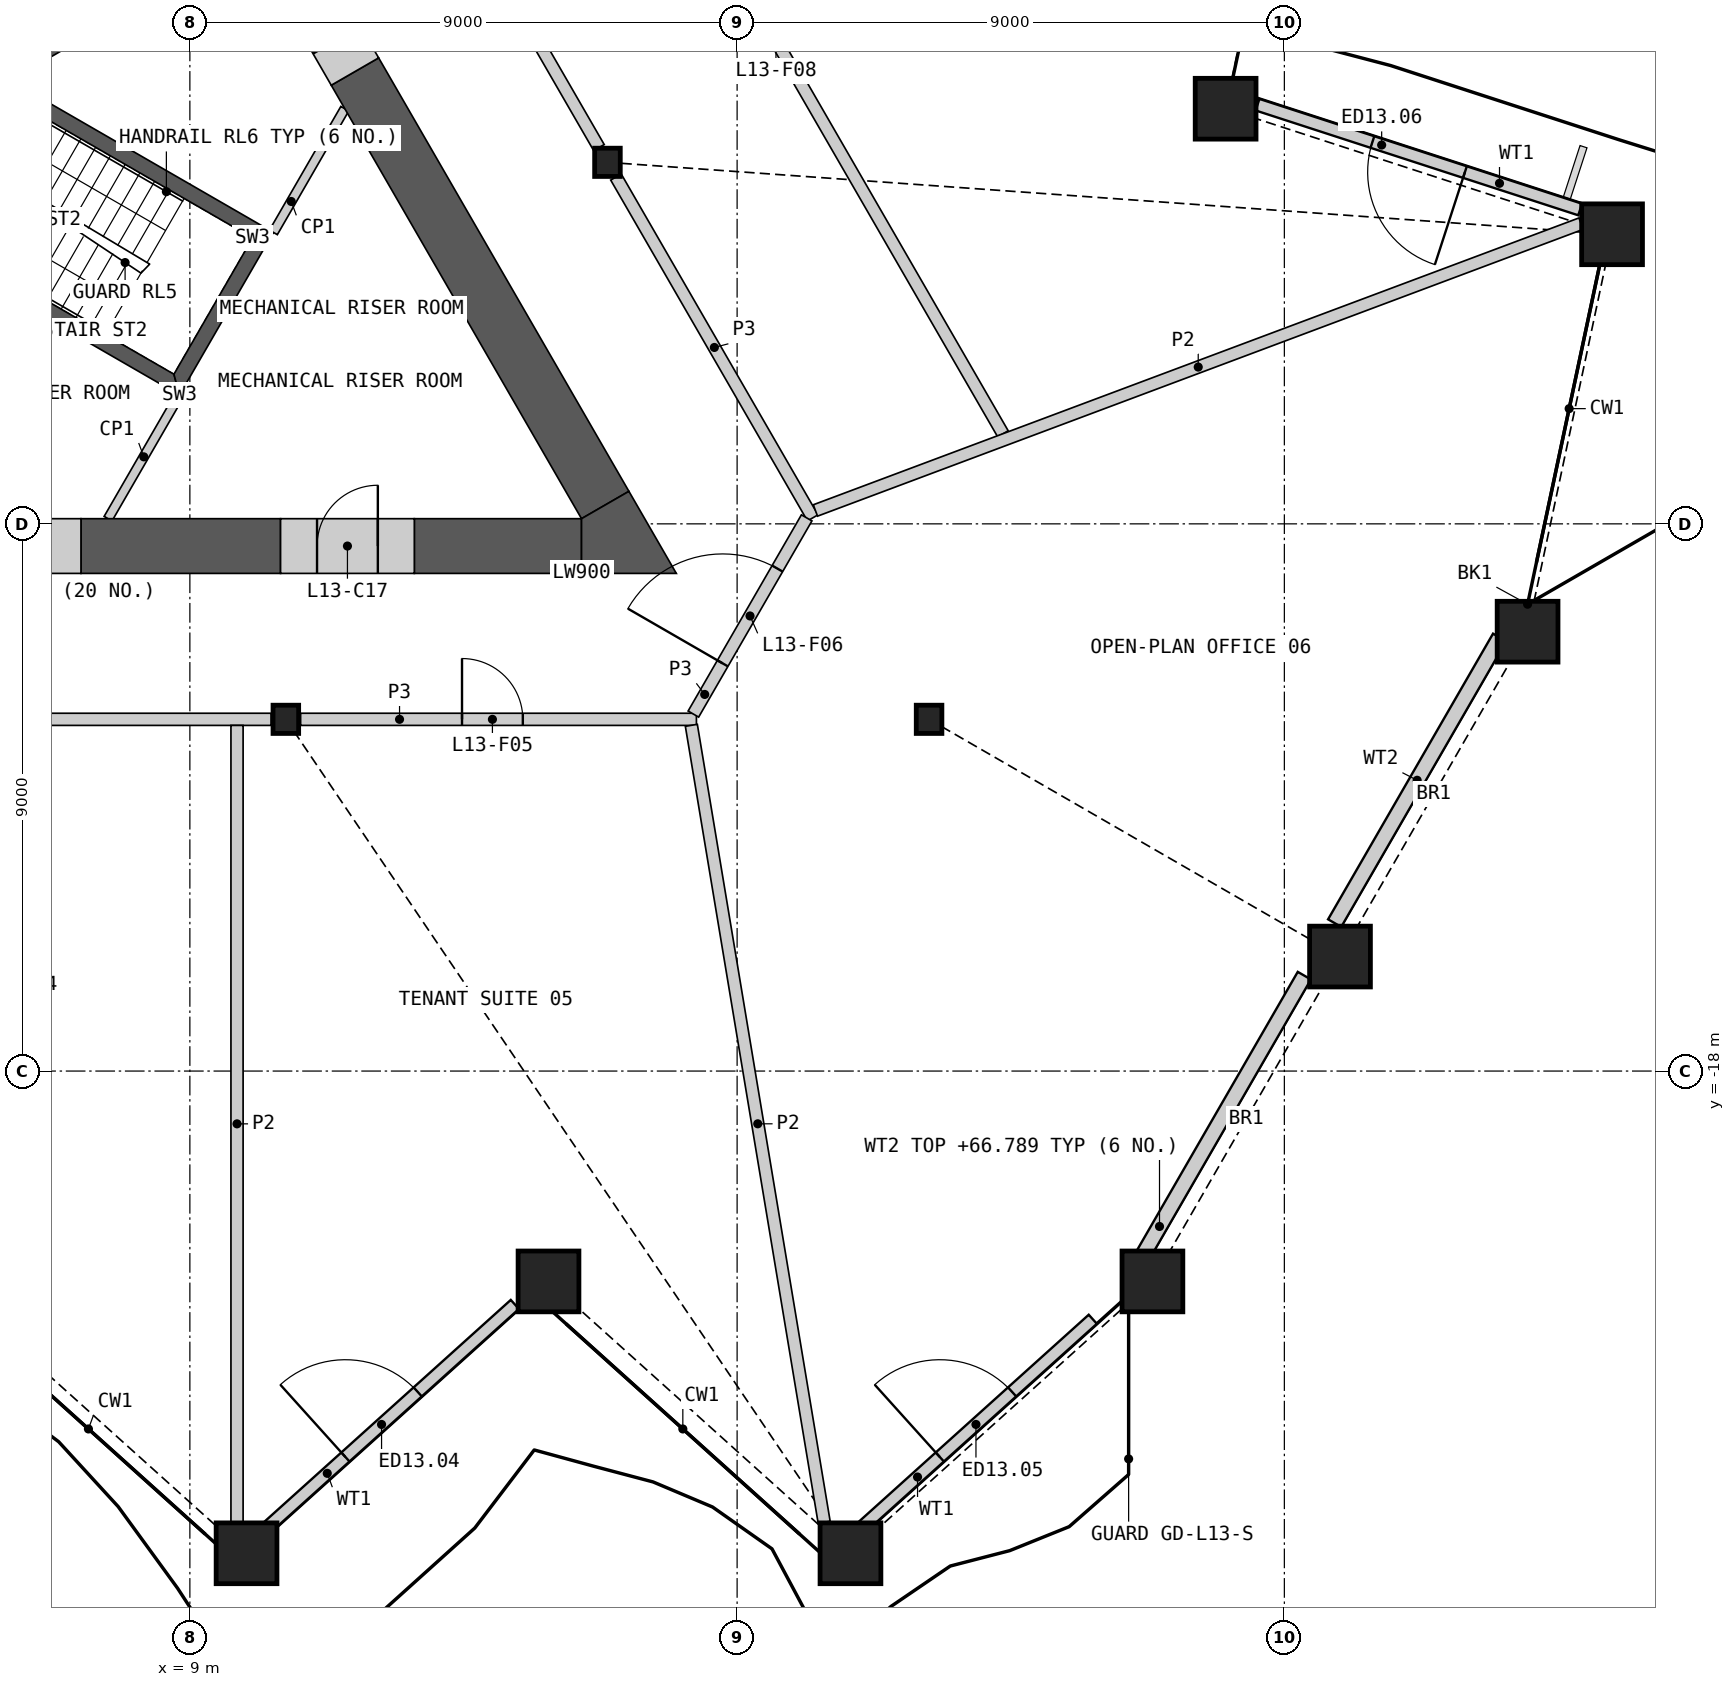
"""IFC4 building model, lengths in metres.
Left out: names, types, materials, properties, quantities, classifications, styles, units other than length and angle.
Written with IfcOpenShell. Run it as: python <this file> out.ifc"""

import sys

from ifc_helpers import new_model, si_unit, direction, frame, frame_2d, origin, origin_2d, place, context, subcontext, project, spatial, polyline, rectangle, hollow_rectangle, i_section, outline, extrude, element, fill, save


model = new_model("IFC4")
c1 = context("Model", 3, precision=1e-05, world=origin(), true_north=direction((0.0, 1.0)))
c2 = subcontext(c1, "Body", "Model", "MODEL_VIEW")
j1 = project(units=[si_unit("LENGTHUNIT", "METRE"), si_unit("PLANEANGLEUNIT", "RADIAN")], contexts=[c1])
p1 = place(None, origin())
s1 = spatial("IfcSite", under=j1, at=p1, CompositionType="ELEMENT")
p2 = place(p1, origin())
s2 = spatial("IfcBuilding", under=s1, at=p2, CompositionType="ELEMENT")
p3 = place(p2, frame((0.0, 0.0, 63.6)))
s3 = spatial("IfcBuildingStorey", under=s2, at=p3, CompositionType="ELEMENT", Elevation=63.6)
for number, where, z_axis, x_axis in (
    (1, (9.932, -25.931, 0.0), (0.0, 0.0, 1.0), (1.0, 0.0, 0.0)),
    (2, (14.898, -21.46, 0.0), (0.0, 0.0, 1.0), (1.0, 0.0, 0.0)),
    (3, (19.864, -25.931, 0.0), (0.0, 0.0, 1.0), (1.0, 0.0, 0.0)),
    (4, (24.83, -21.46, 0.0), (0.0, 0.0, 1.0), (1.0, 0.0, 0.0)),
    (5, (27.915, -16.117, 0.0), (0.0, 0.0, 1.0), (1.0, 0.0, 0.0)),
    (6, (31.0, -10.774, 0.0), (0.0, 0.0, 1.0), (1.0, 0.0, 0.0)),
    (7, (32.389, -4.237, 0.0), (0.0, 0.0, 1.0), (1.0, 0.0, 0.0)),
    (8, (26.034, -2.172, 0.0), (0.0, 0.0, 1.0), (1.0, 0.0, 0.0)),
):
    element("IfcColumn", number, at=place(p3, frame(where, z_axis=z_axis, x_axis=x_axis)), inside=s3, PredefinedType="COLUMN", context=c2, shape_type="SweptSolid", body=[
        extrude(hollow_rectangle(XDim=1.0, YDim=1.0, WallThickness=0.07, at=origin_2d()), origin(), (0.0, 0.0, 1.0), 4.2),
    ])
for number, where, z_axis, x_axis in (
    (9, (10.578, -12.215, 0.0), (0.0, 0.0, 1.0), (1.0, 0.0, 0.0)),
    (10, (21.157, -12.215, 0.0), (0.0, 0.0, 1.0), (1.0, 0.0, 0.0)),
    (11, (15.868, -3.054, 0.0), (0.0, 0.0, 1.0), (1.0, 0.0, 0.0)),
):
    element("IfcColumn", number, at=place(p3, frame(where, z_axis=z_axis, x_axis=x_axis)), inside=s3, PredefinedType="COLUMN", context=c2, shape_type="SweptSolid", body=[
        extrude(i_section(OverallWidth=0.421, OverallDepth=0.465, WebThickness=0.045, FlangeThickness=0.072, at=origin_2d()), origin(), (0.0, 0.0, 1.0), 4.2),
    ])
p4 = place(p3, frame((10.231, -25.542, 0.0), z_axis=(0.0, 0.0, 1.0), x_axis=(0.743162549077, 0.669110921783, 0.0)))
e12 = element("IfcWall", 12, at=p4, inside=s3, PredefinedType="SOLIDWALL", context=c2, shape_type="SweptSolid", body=[
    extrude(rectangle(XDim=5.535, YDim=0.2, at=frame_2d((2.768, 0.0))), origin(), (0.0, 0.0, 1.0), 3.189),
])
p5 = place(p4, frame((1.786, 0.0, 0.0)))
e13 = element("IfcOpeningElement", 13, at=p5, cuts=e12, PredefinedType="OPENING", context=c2, shape_type="SweptSolid", body=[
    extrude(rectangle(XDim=1.6, YDim=2.4, at=frame_2d((0.8, 1.2))), frame((0.0, 0.11, 0.0), z_axis=(0.0, -1.0, 0.0), x_axis=(1.0, 0.0, 0.0)), (0.0, 0.0, 1.0), 0.22),
])
p6 = place(p3, frame((20.007, -25.542, 0.0), z_axis=(0.0, 0.0, 1.0), x_axis=(0.743150930715, 0.669123825743, 0.0)))
e14 = element("IfcWall", 14, at=p6, inside=s3, PredefinedType="SOLIDWALL", context=c2, shape_type="SweptSolid", body=[
    extrude(rectangle(XDim=5.171, YDim=0.2, at=frame_2d((2.585, 0.0))), origin(), (0.0, 0.0, 1.0), 3.189),
])
p7 = place(p6, frame((1.786, 0.0, 0.0)))
e15 = element("IfcOpeningElement", 15, at=p7, cuts=e14, PredefinedType="OPENING", context=c2, shape_type="SweptSolid", body=[
    extrude(rectangle(XDim=1.6, YDim=2.4, at=frame_2d((0.8, 1.2))), frame((0.0, 0.11, 0.0), z_axis=(0.0, -1.0, 0.0), x_axis=(1.0, 0.0, 0.0)), (0.0, 0.0, 1.0), 0.22),
])
p8 = place(p3, frame((24.682, -21.015, 0.0), z_axis=(0.0, 0.0, 1.0), x_axis=(0.500008603535, 0.866020436474, 0.0)))
e16 = element("IfcWall", 16, at=p8, inside=s3, PredefinedType="SOLIDWALL", context=c2, shape_type="SweptSolid", body=[
    extrude(rectangle(XDim=5.293, YDim=0.25, at=frame_2d((2.646, 0.0))), origin(), (0.0, 0.0, 1.0), 3.189),
])
p9 = place(p3, frame((27.827, -15.567, 0.0), z_axis=(0.0, 0.0, 1.0), x_axis=(0.499991204533, 0.86603048179, 0.0)))
e17 = element("IfcWall", 17, at=p9, inside=s3, PredefinedType="SOLIDWALL", context=c2, shape_type="SweptSolid", body=[
    extrude(rectangle(XDim=5.426, YDim=0.25, at=frame_2d((2.713, 0.0))), origin(), (0.0, 0.0, 1.0), 3.189),
])
p10 = place(p3, frame((31.865, -3.83, 0.0), z_axis=(0.0, 0.0, 1.0), x_axis=(-0.951054004345, 0.309024725255, 0.0)))
e18 = element("IfcWall", 18, at=p10, inside=s3, PredefinedType="SOLIDWALL", context=c2, shape_type="SweptSolid", body=[
    extrude(rectangle(XDim=5.579, YDim=0.2, at=frame_2d((2.79, 0.0))), origin(), (0.0, 0.0, 1.0), 3.189),
])
p11 = place(p10, frame((1.992, 0.0, 0.0)))
e19 = element("IfcOpeningElement", 19, at=p11, cuts=e18, PredefinedType="OPENING", context=c2, shape_type="SweptSolid", body=[
    extrude(rectangle(XDim=1.6, YDim=2.4, at=frame_2d((0.8, 1.2))), frame((0.0, 0.11, 0.0), z_axis=(0.0, -1.0, 0.0), x_axis=(1.0, 0.0, 0.0)), (0.0, 0.0, 1.0), 0.22),
])
p12 = place(p3, origin())
e20 = element("IfcWall", 20, at=p12, inside=s3, PredefinedType="SHEAR", context=c2, shape_type="SweptSolid", body=[
    extrude(outline(polyline([(2.66, 4.192), (4.831, 5.445), (8.231, -0.444), (6.061, -1.697), (5.96, -1.524), (7.952, -0.374), (6.952, 1.358), (4.96, 0.208), (4.861, 0.381), (6.852, 1.531), (5.852, 3.263), (3.861, 2.113), (3.76, 2.287), (5.752, 3.437), (4.752, 5.169), (2.76, 4.019), (2.66, 4.192)])), origin(), (0.0, 0.0, 1.0), 3.8),
])
p13 = place(p3, origin())
e21 = element("IfcWall", 21, at=p13, inside=s3, PredefinedType="SHEAR", context=c2, shape_type="SweptSolid", body=[
    extrude(outline(polyline([(3.763, -3.956), (8.83, -6.881), (8.738, -6.539), (3.888, -3.739), (3.763, -3.956)])), origin(), (0.0, 0.0, 1.0), 3.8),
])
p14 = place(p3, origin())
e22 = element("IfcWall", 22, at=p14, inside=s3, PredefinedType="SHEAR", context=c2, shape_type="SweptSolid", body=[
    extrude(outline(polyline([(8.83, -6.881), (10.374, -4.206), (10.032, -4.298), (8.738, -6.539), (8.83, -6.881)])), origin(), (0.0, 0.0, 1.0), 3.8),
])
p15 = place(p3, origin())
e23 = element("IfcWall", 23, at=p15, inside=s3, PredefinedType="SHEAR", context=c2, shape_type="SweptSolid", body=[
    extrude(outline(polyline([(10.032, -4.298), (10.374, -4.206), (5.307, -1.281), (5.182, -1.498), (10.032, -4.298)])), origin(), (0.0, 0.0, 1.0), 3.8),
])
p16 = place(p3, frame((8.83, -6.881, 0.0), z_axis=(0.0, 0.0, 1.0), x_axis=(-0.500073279432, -0.865983091751, 0.0)))
e24 = element("IfcWall", 24, at=p16, inside=s3, PredefinedType="PARTITIONING", context=c2, shape_type="SweptSolid", body=[
    extrude(rectangle(XDim=2.349, YDim=0.15, at=frame_2d((1.175, 0.0))), origin(), (0.0, 0.0, 1.0), 3.8),
])
p17 = place(p3, frame((10.374, -4.206, 0.0), z_axis=(0.0, 0.0, 1.0), x_axis=(0.499995339376, 0.86602809458, 0.0)))
e25 = element("IfcWall", 25, at=p17, inside=s3, PredefinedType="PARTITIONING", context=c2, shape_type="SweptSolid", body=[
    extrude(rectangle(XDim=2.349, YDim=0.15, at=frame_2d((1.175, 0.0))), origin(), (0.0, 0.0, 1.0), 3.8),
])
p18 = place(p3, frame((7.209, -9.365, 0.0), z_axis=(0.0, 0.0, 1.0), x_axis=(1.0, 0.0, 0.0)))
e26 = element("IfcWall", 26, at=p18, inside=s3, PredefinedType="SHEAR", context=c2, shape_type="SweptSolid", body=[
    extrude(rectangle(XDim=3.282, YDim=0.9, at=frame_2d((1.641, 0.0))), origin(), (0.0, 0.0, 1.0), 3.8),
])
p19 = place(p3, frame((12.691, -9.365, 0.0), z_axis=(0.0, 0.0, 1.0), x_axis=(1.0, 0.0, 0.0)))
e27 = element("IfcWall", 27, at=p19, inside=s3, PredefinedType="SHEAR", context=c2, shape_type="SweptSolid", body=[
    extrude(rectangle(XDim=2.75, YDim=0.9, at=frame_2d((1.375, 0.0))), origin(), (0.0, 0.0, 1.0), 3.8),
])
p20 = place(p3, frame((15.831, -8.69, 0.0), z_axis=(0.0, 0.0, 1.0), x_axis=(-0.499995435471, 0.8660280391, 0.0)))
e28 = element("IfcWall", 28, at=p20, inside=s3, PredefinedType="SHEAR", context=c2, shape_type="SweptSolid", body=[
    extrude(rectangle(XDim=8.232, YDim=0.9, at=frame_2d((4.116, 0.0))), origin(), (0.0, 0.0, 1.0), 3.8),
])
p21 = place(p3, origin())
e29 = element("IfcWall", 29, at=p21, inside=s3, PredefinedType="SHEAR", context=c2, shape_type="SweptSolid", body=[
    extrude(outline(polyline([(15.441, -9.815), (15.441, -8.915), (16.221, -8.465), (17.0, -9.815), (15.441, -9.815)])), origin(), (0.0, 0.0, 1.0), 3.8),
])
p22 = place(p3, frame((10.491, -9.365, 0.0), z_axis=(0.0, 0.0, 1.0), x_axis=(1.0, 0.0, 0.0)))
e30 = element("IfcWall", 30, at=p22, inside=s3, PredefinedType="SHEAR", context=c2, shape_type="SweptSolid", body=[
    extrude(rectangle(XDim=2.2, YDim=0.9, at=frame_2d((1.1, 0.0))), origin(), (0.0, 0.0, 1.0), 3.8),
])
p23 = place(p22, frame((0.6, 0.0, 0.0)))
e31 = element("IfcOpeningElement", 31, at=p23, cuts=e30, PredefinedType="OPENING", context=c2, shape_type="SweptSolid", body=[
    extrude(rectangle(XDim=1.0, YDim=2.1, at=frame_2d((0.5, 1.05))), frame((0.0, 0.46, 0.0), z_axis=(0.0, -1.0, 0.0), x_axis=(1.0, 0.0, 0.0)), (0.0, 0.0, 1.0), 0.92),
])
p24 = place(p3, frame((11.715, -1.561, 0.0), z_axis=(0.0, 0.0, 1.0), x_axis=(-0.499946605688, 0.86605622881, 0.0)))
e32 = element("IfcWall", 32, at=p24, inside=s3, PredefinedType="SHEAR", context=c2, shape_type="SweptSolid", body=[
    extrude(rectangle(XDim=2.2, YDim=0.9, at=frame_2d((1.1, 0.0))), origin(), (0.0, 0.0, 1.0), 3.8),
])
p25 = place(p24, frame((0.6, 0.0, 0.0)))
e33 = element("IfcOpeningElement", 33, at=p25, cuts=e32, PredefinedType="OPENING", context=c2, shape_type="SweptSolid", body=[
    extrude(rectangle(XDim=1.0, YDim=2.1, at=frame_2d((0.5, 1.05))), frame((0.0, 0.46, 0.0), z_axis=(0.0, -1.0, 0.0), x_axis=(1.0, 0.0, 0.0)), (0.0, 0.0, 1.0), 0.92),
])
p26 = place(p3, frame((5.009, -9.365, 0.0), z_axis=(0.0, 0.0, 1.0), x_axis=(1.0, 0.0, 0.0)))
e34 = element("IfcWall", 34, at=p26, inside=s3, PredefinedType="SHEAR", context=c2, shape_type="SweptSolid", body=[
    extrude(rectangle(XDim=2.2, YDim=0.9, at=frame_2d((1.1, 0.0))), origin(), (0.0, 0.0, 1.0), 3.8),
])
p27 = place(p26, frame((0.6, 0.0, 0.0)))
e35 = element("IfcOpeningElement", 35, at=p27, cuts=e34, PredefinedType="OPENING", context=c2, shape_type="SweptSolid", body=[
    extrude(rectangle(XDim=1.0, YDim=2.1, at=frame_2d((0.5, 1.05))), frame((0.0, 0.46, 0.0), z_axis=(0.0, -1.0, 0.0), x_axis=(1.0, 0.0, 0.0)), (0.0, 0.0, 1.0), 0.92),
])
p28 = place(p3, frame((0.242, -12.215, 0.0), z_axis=(0.0, 0.0, 1.0), x_axis=(1.0, 0.0, 0.0)))
e36 = element("IfcWall", 36, at=p28, inside=s3, PredefinedType="PARTITIONING", context=c2, shape_type="SweptSolid", body=[
    extrude(rectangle(XDim=10.094, YDim=0.2, at=frame_2d((5.047, 0.0))), origin(), (0.0, 0.0, 1.0), 3.8),
])
p29 = place(p28, frame((4.294, 0.0, 0.0)))
e37 = element("IfcOpeningElement", 37, at=p29, cuts=e36, PredefinedType="OPENING", context=c2, shape_type="SweptSolid", body=[
    extrude(rectangle(XDim=1.0, YDim=2.1, at=frame_2d((0.5, 1.05))), frame((0.0, 0.11, 0.0), z_axis=(0.0, -1.0, 0.0), x_axis=(1.0, 0.0, 0.0)), (0.0, 0.0, 1.0), 0.22),
])
p30 = place(p3, frame((10.719, 5.865, 0.0), z_axis=(0.0, 0.0, 1.0), x_axis=(0.49999175339, -0.866030164915, 0.0)))
e38 = element("IfcWall", 38, at=p30, inside=s3, PredefinedType="PARTITIONING", context=c2, shape_type="SweptSolid", body=[
    extrude(rectangle(XDim=10.019, YDim=0.2, at=frame_2d((5.009, 0.0))), origin(), (0.0, 0.0, 1.0), 3.8),
])
p31 = place(p30, frame((4.585, 0.0, 0.0)))
e39 = element("IfcOpeningElement", 39, at=p31, cuts=e38, PredefinedType="OPENING", context=c2, shape_type="SweptSolid", body=[
    extrude(rectangle(XDim=0.95, YDim=2.1, at=frame_2d((0.475, 1.05))), frame((0.0, 0.11, 0.0), z_axis=(0.0, -1.0, 0.0), x_axis=(1.0, 0.0, 0.0)), (0.0, 0.0, 1.0), 0.22),
])
p32 = place(p3, frame((10.821, -12.215, 0.0), z_axis=(0.0, 0.0, 1.0), x_axis=(1.0, 0.0, 0.0)))
e40 = element("IfcWall", 40, at=p32, inside=s3, PredefinedType="PARTITIONING", context=c2, shape_type="SweptSolid", body=[
    extrude(rectangle(XDim=6.51, YDim=0.2, at=frame_2d((3.255, 0.0))), origin(), (0.0, 0.0, 1.0), 3.8),
])
p33 = place(p32, frame((2.655, 0.0, 0.0)))
e41 = element("IfcOpeningElement", 41, at=p33, cuts=e40, PredefinedType="OPENING", context=c2, shape_type="SweptSolid", body=[
    extrude(rectangle(XDim=1.0, YDim=2.1, at=frame_2d((0.5, 1.05))), frame((0.0, 0.11, 0.0), z_axis=(0.0, -1.0, 0.0), x_axis=(1.0, 0.0, 0.0)), (0.0, 0.0, 1.0), 0.22),
])
p34 = place(p3, frame((16.008, -3.296, 0.0), z_axis=(0.0, 0.0, 1.0), x_axis=(0.499984737558, -0.86603421538, 0.0)))
e42 = element("IfcWall", 42, at=p34, inside=s3, PredefinedType="PARTITIONING", context=c2, shape_type="SweptSolid", body=[
    extrude(rectangle(XDim=6.473, YDim=0.2, at=frame_2d((3.236, 0.0))), origin(), (0.0, 0.0, 1.0), 3.8),
])
p35 = place(p3, frame((17.281, -12.128, 0.0), z_axis=(0.0, 0.0, 1.0), x_axis=(0.499958791762, 0.866049194065, 0.0)))
e43 = element("IfcWall", 43, at=p35, inside=s3, PredefinedType="PARTITIONING", context=c2, shape_type="SweptSolid", body=[
    extrude(rectangle(XDim=3.726, YDim=0.2, at=frame_2d((1.863, 0.0))), origin(), (0.0, 0.0, 1.0), 3.8),
])
p36 = place(p35, frame((0.963, 0.0, 0.0)))
e44 = element("IfcOpeningElement", 44, at=p36, cuts=e43, PredefinedType="OPENING", context=c2, shape_type="SweptSolid", body=[
    extrude(rectangle(XDim=1.8, YDim=2.1, at=frame_2d((0.9, 1.05))), frame((0.0, 0.11, 0.0), z_axis=(0.0, -1.0, 0.0), x_axis=(1.0, 0.0, 0.0)), (0.0, 0.0, 1.0), 0.22),
])
p37 = place(p3, frame((13.573, 7.721, 0.0), z_axis=(0.0, 0.0, 1.0), x_axis=(0.499990262232, -0.866031025814, 0.0)))
e45 = element("IfcWall", 45, at=p37, inside=s3, PredefinedType="PARTITIONING", context=c2, shape_type="SweptSolid", body=[
    extrude(rectangle(XDim=17.597, YDim=0.2, at=frame_2d((8.799, 0.0))), origin(), (0.0, 0.0, 1.0), 2.885),
])
p38 = place(p37, frame((9.277, 0.0, 0.0)))
e46 = element("IfcOpeningElement", 46, at=p38, cuts=e45, PredefinedType="OPENING", context=c2, shape_type="SweptSolid", body=[
    extrude(rectangle(XDim=0.95, YDim=2.1, at=frame_2d((0.475, 1.05))), frame((0.0, 0.11, 0.0), z_axis=(0.0, -1.0, 0.0), x_axis=(1.0, 0.0, 0.0)), (0.0, 0.0, 1.0), 0.22),
])
p39 = place(p3, frame((19.288, -8.78, 0.0), z_axis=(0.0, 0.0, 1.0), x_axis=(0.93644254502, 0.350820979814, 0.0)))
e47 = element("IfcWall", 47, at=p39, inside=s3, PredefinedType="PARTITIONING", context=c2, shape_type="SweptSolid", body=[
    extrude(rectangle(XDim=13.447, YDim=0.2, at=frame_2d((6.723, 0.0))), origin(), (0.0, 0.0, 1.0), 2.885),
])
p40 = place(p3, frame((17.247, -12.314, 0.0), z_axis=(0.0, 0.0, 1.0), x_axis=(0.164396008001, -0.986394420378, 0.0)))
e48 = element("IfcWall", 48, at=p40, inside=s3, PredefinedType="PARTITIONING", context=c2, shape_type="SweptSolid", body=[
    extrude(rectangle(XDim=13.289, YDim=0.2, at=frame_2d((6.644, 0.0))), origin(), (0.0, 0.0, 1.0), 2.885),
])
p41 = place(p3, frame((9.775, -25.421, 0.0), z_axis=(0.0, 0.0, 1.0), x_axis=(0.0, 1.0, 0.0)))
e49 = element("IfcWall", 49, at=p41, inside=s3, PredefinedType="PARTITIONING", context=c2, shape_type="SweptSolid", body=[
    extrude(rectangle(XDim=13.106, YDim=0.2, at=frame_2d((6.553, 0.0))), origin(), (0.0, 0.0, 1.0), 2.885),
])
p42 = place(p5, origin())
e50 = element("IfcDoor", 50, at=p42, inside=s3, OperationType="DOUBLE_DOOR_SINGLE_SWING", PredefinedType="DOOR", context=c2, shape_type="SweptSolid", body=[
    extrude(rectangle(XDim=1.6, YDim=2.4, at=frame_2d((0.8, 1.2))), frame((0.0, 0.025, 0.0), z_axis=(0.0, -1.0, 0.0), x_axis=(1.0, 0.0, 0.0)), (0.0, 0.0, 1.0), 0.05),
])
fill(e13, e50)
p43 = place(p7, origin())
e51 = element("IfcDoor", 51, at=p43, inside=s3, OperationType="DOUBLE_DOOR_SINGLE_SWING", PredefinedType="DOOR", context=c2, shape_type="SweptSolid", body=[
    extrude(rectangle(XDim=1.6, YDim=2.4, at=frame_2d((0.8, 1.2))), frame((0.0, 0.025, 0.0), z_axis=(0.0, -1.0, 0.0), x_axis=(1.0, 0.0, 0.0)), (0.0, 0.0, 1.0), 0.05),
])
fill(e15, e51)
p44 = place(p11, origin())
e52 = element("IfcDoor", 52, at=p44, inside=s3, OperationType="DOUBLE_DOOR_SINGLE_SWING", PredefinedType="DOOR", context=c2, shape_type="SweptSolid", body=[
    extrude(rectangle(XDim=1.6, YDim=2.4, at=frame_2d((0.8, 1.2))), frame((0.0, 0.025, 0.0), z_axis=(0.0, -1.0, 0.0), x_axis=(1.0, 0.0, 0.0)), (0.0, 0.0, 1.0), 0.05),
])
fill(e19, e52)
p45 = place(p23, origin())
e53 = element("IfcDoor", 53, at=p45, inside=s3, OperationType="SINGLE_SWING_RIGHT", PredefinedType="DOOR", context=c2, shape_type="SweptSolid", body=[
    extrude(rectangle(XDim=1.0, YDim=2.1, at=frame_2d((0.5, 1.05))), frame((0.0, 0.205, 0.0), z_axis=(0.0, -1.0, 0.0), x_axis=(1.0, 0.0, 0.0)), (0.0, 0.0, 1.0), 0.05),
])
fill(e31, e53)
p46 = place(p33, origin())
e54 = element("IfcDoor", 54, at=p46, inside=s3, OperationType="SINGLE_SWING_LEFT", PredefinedType="DOOR", context=c2, shape_type="SweptSolid", body=[
    extrude(rectangle(XDim=1.0, YDim=2.1, at=frame_2d((0.5, 1.05))), frame((0.0, 0.025, 0.0), z_axis=(0.0, -1.0, 0.0), x_axis=(1.0, 0.0, 0.0)), (0.0, 0.0, 1.0), 0.05),
])
fill(e41, e54)
p47 = place(p36, origin())
e55 = element("IfcDoor", 55, at=p47, inside=s3, OperationType="DOUBLE_DOOR_SINGLE_SWING", PredefinedType="DOOR", context=c2, shape_type="SweptSolid", body=[
    extrude(rectangle(XDim=1.8, YDim=2.1, at=frame_2d((0.9, 1.05))), frame((0.0, 0.025, 0.0), z_axis=(0.0, -1.0, 0.0), x_axis=(1.0, 0.0, 0.0)), (0.0, 0.0, 1.0), 0.05),
])
fill(e44, e55)
save(model, sys.argv[1])
